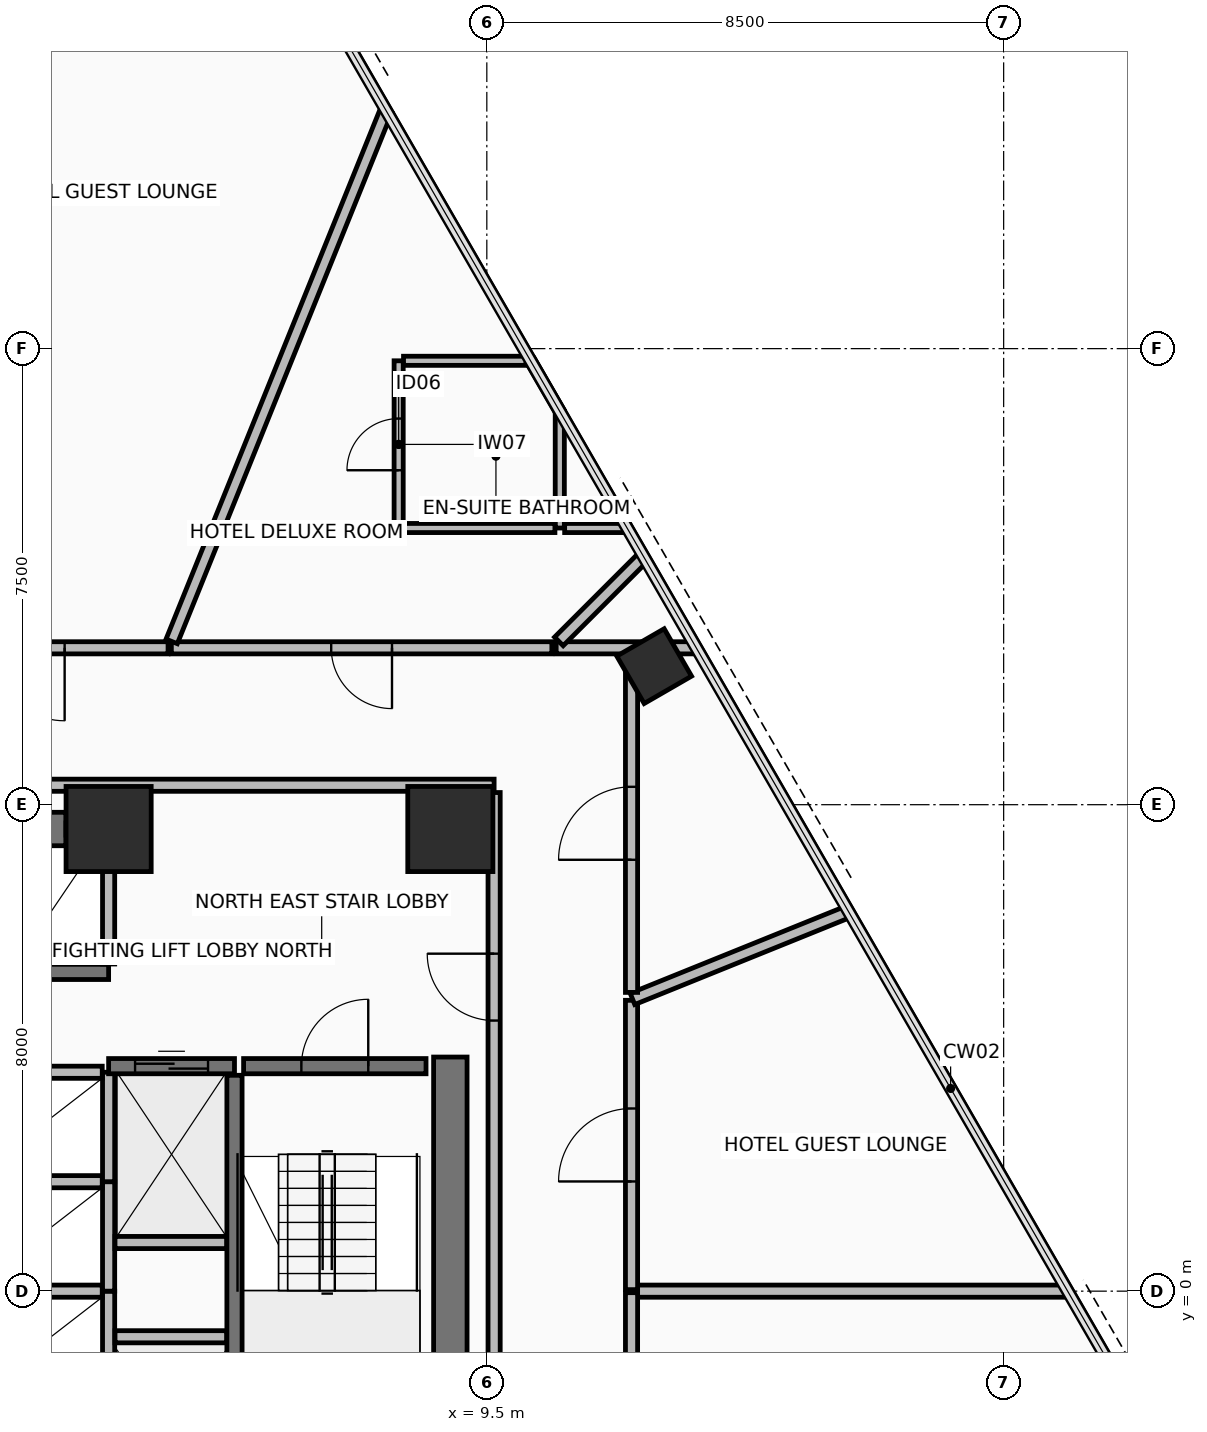
"""IFC4 building model, lengths in metres.
Left out: names, types, materials, properties, quantities, classifications, styles, units other than length and angle.
Written with IfcOpenShell. Run it as: python <this file> out.ifc"""

import sys

from ifc_helpers import new_model, si_unit, direction, frame, frame_2d, origin, origin_2d, place, context, subcontext, project, spatial, rectangle, hollow_rectangle, extrude, element, fill, save


model = new_model("IFC4")
c1 = context("Model", 3, precision=1e-05, world=origin(), true_north=direction((0.0, 1.0)))
c2 = subcontext(c1, "Body", "Model", "MODEL_VIEW")
j1 = project(units=[si_unit("LENGTHUNIT", "METRE"), si_unit("PLANEANGLEUNIT", "RADIAN")], contexts=[c1])
p1 = place(None, origin())
s1 = spatial("IfcSite", under=j1, at=p1, CompositionType="ELEMENT")
p2 = place(p1, origin())
s2 = spatial("IfcBuilding", under=s1, at=p2, CompositionType="ELEMENT")
p3 = place(p2, frame((0.0, 0.0, 42.05)))
s3 = spatial("IfcBuildingStorey", under=s2, at=p3, CompositionType="ELEMENT", Elevation=42.05)
for number, where, z_axis, x_axis in (
    (1, (8.9, 7.6, 0.0), (0.0, 0.0, 1.0), (1.0, 0.0, 0.0)),
    (2, (3.28, 7.6, 0.0), (0.0, 0.0, 1.0), (1.0, 0.0, 0.0)),
):
    element("IfcColumn", number, at=place(p3, frame(where, z_axis=z_axis, x_axis=x_axis)), inside=s3, PredefinedType="COLUMN", context=c2, shape_type="SweptSolid", body=[
        extrude(rectangle(XDim=1.4, YDim=1.4, at=origin_2d()), origin(), (0.0, 0.0, 1.0), 3.4),
    ])
p4 = place(p3, frame((12.252, 10.279, 0.0), z_axis=(0.0, 0.0, 1.0), x_axis=(-0.500001511499, 0.866024531118, 0.0)))
e3 = element("IfcColumn", 3, at=p4, inside=s3, PredefinedType="COLUMN", context=c2, shape_type="SweptSolid", body=[
    extrude(hollow_rectangle(XDim=0.9, YDim=0.9, WallThickness=0.05, at=origin_2d()), origin(), (0.0, 0.0, 1.0), 3.4),
])
p5 = place(p3, frame((3.8, 26.418, 0.0), z_axis=(0.0, 0.0, 1.0), x_axis=(-0.500005158081, -0.866022425744, 0.0)))
e4 = element("IfcWall", 4, at=p5, inside=s3, PredefinedType="STANDARD", context=c2, shape_type="SweptSolid", body=[
    extrude(rectangle(XDim=7.6, YDim=0.3, at=frame_2d((3.8, 0.0))), origin(), (0.0, 0.0, 1.0), 2.42),
])
p6 = place(p5, frame((3.25, 0.0, 0.0)))
e5 = element("IfcOpeningElement", 5, at=p6, cuts=e4, PredefinedType="OPENING", context=c2, shape_type="SweptSolid", body=[
    extrude(rectangle(XDim=1.1, YDim=2.2, at=frame_2d((0.55, 1.1))), frame((0.0, 0.16, 0.0), z_axis=(0.0, -1.0, 0.0), x_axis=(1.0, 0.0, 0.0)), (0.0, 0.0, 1.0), 0.32),
])
p7 = place(p3, frame((-2.8, 7.6, 0.0), z_axis=(0.0, 0.0, 1.0), x_axis=(1.0, 0.0, 0.0)))
e6 = element("IfcWall", 6, at=p7, inside=s3, PredefinedType="SHEAR", context=c2, shape_type="SweptSolid", body=[
    extrude(rectangle(XDim=5.38, YDim=0.55, at=frame_2d((2.69, 0.0))), origin(), (0.0, 0.0, 1.0), 3.225),
])
p8 = place(p3, frame((8.9, -6.85, 0.0), z_axis=(0.0, 0.0, 1.0), x_axis=(0.0, 1.0, 0.0)))
e7 = element("IfcWall", 7, at=p8, inside=s3, PredefinedType="SHEAR", context=c2, shape_type="SweptSolid", body=[
    extrude(rectangle(XDim=10.7, YDim=0.55, at=frame_2d((5.35, 0.0))), origin(), (0.0, 0.0, 1.0), 3.225),
])
p9 = place(p3, frame((9.62, 8.32, 0.0), z_axis=(0.0, 0.0, 1.0), x_axis=(-1.0, 0.0, 0.0)))
e8 = element("IfcWall", 8, at=p9, inside=s3, PredefinedType="PARTITIONING", context=c2, shape_type="SweptSolid", body=[
    extrude(rectangle(XDim=19.24, YDim=0.2, at=frame_2d((9.62, 0.0))), origin(), (0.0, 0.0, 1.0), 2.57),
])
p10 = place(p9, frame((15.745, 0.0, 0.0)))
e9 = element("IfcOpeningElement", 9, at=p10, cuts=e8, PredefinedType="OPENING", context=c2, shape_type="SweptSolid", body=[
    extrude(rectangle(XDim=0.9, YDim=2.1, at=frame_2d((0.45, 1.05))), frame((0.0, 0.11, 0.0), z_axis=(0.0, -1.0, 0.0), x_axis=(1.0, 0.0, 0.0)), (0.0, 0.0, 1.0), 0.22),
])
p11 = place(p9, frame((13.795, 0.0, 0.0)))
e10 = element("IfcOpeningElement", 10, at=p11, cuts=e8, PredefinedType="OPENING", context=c2, shape_type="SweptSolid", body=[
    extrude(rectangle(XDim=0.9, YDim=2.1, at=frame_2d((0.45, 1.05))), frame((0.0, 0.11, 0.0), z_axis=(0.0, -1.0, 0.0), x_axis=(1.0, 0.0, 0.0)), (0.0, 0.0, 1.0), 0.22),
])
p12 = place(p3, frame((9.62, -8.2, 0.0), z_axis=(0.0, 0.0, 1.0), x_axis=(0.0, 1.0, 0.0)))
e11 = element("IfcWall", 11, at=p12, inside=s3, PredefinedType="PARTITIONING", context=c2, shape_type="SweptSolid", body=[
    extrude(rectangle(XDim=16.4, YDim=0.2, at=frame_2d((8.2, 0.0))), origin(), (0.0, 0.0, 1.0), 2.62),
])
p13 = place(p12, frame((12.65, 0.0, 0.0)))
e12 = element("IfcOpeningElement", 12, at=p13, cuts=e11, PredefinedType="OPENING", context=c2, shape_type="SweptSolid", body=[
    extrude(rectangle(XDim=1.1, YDim=2.15, at=frame_2d((0.55, 1.075))), frame((0.0, 0.11, 0.0), z_axis=(0.0, -1.0, 0.0), x_axis=(1.0, 0.0, 0.0)), (0.0, 0.0, 1.0), 0.22),
])
p14 = place(p3, frame((5.35, -3.75, 0.0), z_axis=(0.0, 0.0, 1.0), x_axis=(0.0, 1.0, 0.0)))
e13 = element("IfcWall", 13, at=p14, inside=s3, PredefinedType="SHEAR", context=c2, shape_type="SweptSolid", body=[
    extrude(rectangle(XDim=7.3, YDim=0.25, at=frame_2d((3.65, 0.0))), origin(), (0.0, 0.0, 1.0), 3.225),
])
p15 = place(p3, frame((5.5, 3.7, 0.0), z_axis=(0.0, 0.0, 1.0), x_axis=(1.0, 0.0, 0.0)))
e14 = element("IfcWall", 14, at=p15, inside=s3, PredefinedType="SHEAR", context=c2, shape_type="SweptSolid", body=[
    extrude(rectangle(XDim=3.0, YDim=0.25, at=frame_2d((1.5, 0.0))), origin(), (0.0, 0.0, 1.0), 3.225),
])
p16 = place(p15, frame((0.95, 0.0, 0.0)))
e15 = element("IfcOpeningElement", 15, at=p16, cuts=e14, PredefinedType="OPENING", context=c2, shape_type="SweptSolid", body=[
    extrude(rectangle(XDim=1.1, YDim=2.15, at=frame_2d((0.55, 1.075))), frame((0.0, 0.135, 0.0), z_axis=(0.0, -1.0, 0.0), x_axis=(1.0, 0.0, 0.0)), (0.0, 0.0, 1.0), 0.27),
])
p17 = place(p3, frame((1.637, 5.25, 0.0), z_axis=(0.0, 0.0, 1.0), x_axis=(1.0, 0.0, 0.0)))
e16 = element("IfcWall", 16, at=p17, inside=s3, PredefinedType="SHEAR", context=c2, shape_type="SweptSolid", body=[
    extrude(rectangle(XDim=1.643, YDim=0.25, at=frame_2d((0.821, 0.0))), origin(), (0.0, 0.0, 1.0), 3.225),
])
p18 = place(p3, frame((2.58, 7.6, 0.0), z_axis=(0.0, 0.0, 1.0), x_axis=(1.0, 0.0, 0.0)))
e17 = element("IfcWall", 17, at=p18, inside=s3, PredefinedType="PARTITIONING", context=c2, shape_type="SweptSolid", body=[
    extrude(rectangle(XDim=0.7, YDim=0.2, at=frame_2d((0.35, 0.0))), origin(), (0.0, 0.0, 1.0), 2.42),
])
p19 = place(p3, frame((3.28, 5.38, 0.0), z_axis=(0.0, 0.0, 1.0), x_axis=(0.0, 1.0, 0.0)))
e18 = element("IfcWall", 18, at=p19, inside=s3, PredefinedType="PARTITIONING", context=c2, shape_type="SweptSolid", body=[
    extrude(rectangle(XDim=2.115, YDim=0.2, at=frame_2d((1.058, 0.0))), origin(), (0.0, 0.0, 1.0), 2.42),
])
p20 = place(p3, frame((3.28, -1.8, 0.0), z_axis=(0.0, 0.0, 1.0), x_axis=(0.0, 1.0, 0.0)))
e19 = element("IfcWall", 19, at=p20, inside=s3, PredefinedType="PARTITIONING", context=c2, shape_type="SweptSolid", body=[
    extrude(rectangle(XDim=1.8, YDim=0.2, at=frame_2d((0.9, 0.0))), origin(), (0.0, 0.0, 1.0), 3.225),
])
p21 = place(p3, frame((1.13, 0.0, 0.0), z_axis=(0.0, 0.0, 1.0), x_axis=(1.0, 0.0, 0.0)))
e20 = element("IfcWall", 20, at=p21, inside=s3, PredefinedType="PARTITIONING", context=c2, shape_type="SweptSolid", body=[
    extrude(rectangle(XDim=2.045, YDim=0.2, at=frame_2d((1.022, 0.0))), origin(), (0.0, 0.0, 1.0), 3.225),
])
p22 = place(p3, frame((3.28, 0.0, 0.0), z_axis=(0.0, 0.0, 1.0), x_axis=(0.0, 1.0, 0.0)))
e21 = element("IfcWall", 21, at=p22, inside=s3, PredefinedType="PARTITIONING", context=c2, shape_type="SweptSolid", body=[
    extrude(rectangle(XDim=1.8, YDim=0.2, at=frame_2d((0.9, 0.0))), origin(), (0.0, 0.0, 1.0), 3.225),
])
p23 = place(p3, frame((1.13, 1.8, 0.0), z_axis=(0.0, 0.0, 1.0), x_axis=(1.0, 0.0, 0.0)))
e22 = element("IfcWall", 22, at=p23, inside=s3, PredefinedType="PARTITIONING", context=c2, shape_type="SweptSolid", body=[
    extrude(rectangle(XDim=2.045, YDim=0.2, at=frame_2d((1.022, 0.0))), origin(), (0.0, 0.0, 1.0), 3.225),
])
p24 = place(p3, frame((3.28, 1.8, 0.0), z_axis=(0.0, 0.0, 1.0), x_axis=(0.0, 1.0, 0.0)))
e23 = element("IfcWall", 23, at=p24, inside=s3, PredefinedType="PARTITIONING", context=c2, shape_type="SweptSolid", body=[
    extrude(rectangle(XDim=1.8, YDim=0.2, at=frame_2d((0.9, 0.0))), origin(), (0.0, 0.0, 1.0), 3.225),
])
p25 = place(p3, frame((1.13, 3.6, 0.0), z_axis=(0.0, 0.0, 1.0), x_axis=(1.0, 0.0, 0.0)))
e24 = element("IfcWall", 24, at=p25, inside=s3, PredefinedType="PARTITIONING", context=c2, shape_type="SweptSolid", body=[
    extrude(rectangle(XDim=2.045, YDim=0.2, at=frame_2d((1.022, 0.0))), origin(), (0.0, 0.0, 1.0), 2.42),
])
p26 = place(p3, frame((3.28, 3.7, 0.0), z_axis=(0.0, 0.0, 1.0), x_axis=(1.0, 0.0, 0.0)))
e25 = element("IfcWall", 25, at=p26, inside=s3, PredefinedType="SHEAR", context=c2, shape_type="SweptSolid", body=[
    extrude(rectangle(XDim=2.07, YDim=0.25, at=frame_2d((1.035, 0.0))), origin(), (0.0, 0.0, 1.0), 3.225),
])
p27 = place(p26, frame((0.435, 0.0, 0.0)))
e26 = element("IfcOpeningElement", 26, at=p27, cuts=e25, PredefinedType="OPENING", context=c2, shape_type="SweptSolid", body=[
    extrude(rectangle(XDim=1.2, YDim=2.2, at=frame_2d((0.6, 1.1))), frame((0.0, 0.135, 0.0), z_axis=(0.0, -1.0, 0.0), x_axis=(1.0, 0.0, 0.0)), (0.0, 0.0, 1.0), 0.27),
])
for number, where, z_axis, x_axis in (
    (27, (3.385, 0.8, 0.0), (0.0, 0.0, 1.0), (1.0, 0.0, 0.0)),
    (28, (3.385, -0.75, 0.0), (0.0, 0.0, 1.0), (1.0, 0.0, 0.0)),
):
    element("IfcWall", number, at=place(p3, frame(where, z_axis=z_axis, x_axis=x_axis)), inside=s3, PredefinedType="PARTITIONING", context=c2, shape_type="SweptSolid", body=[
        extrude(rectangle(XDim=1.835, YDim=0.2, at=frame_2d((0.917, 0.0))), origin(), (0.0, 0.0, 1.0), 3.225),
    ])
p28 = place(p3, frame((8.05, 12.55, 0.0), z_axis=(0.0, 0.0, 1.0), x_axis=(0.0, 1.0, 0.0)))
e29 = element("IfcWall", 29, at=p28, inside=s3, PredefinedType="PARTITIONING", context=c2, shape_type="SweptSolid", body=[
    extrude(rectangle(XDim=2.75, YDim=0.15, at=frame_2d((1.375, 0.0))), origin(), (0.0, 0.0, 1.0), 2.82),
])
p29 = place(p28, frame((0.95, 0.0, 0.0)))
e30 = element("IfcOpeningElement", 30, at=p29, cuts=e29, PredefinedType="OPENING", context=c2, shape_type="SweptSolid", body=[
    extrude(rectangle(XDim=0.85, YDim=2.1, at=frame_2d((0.425, 1.05))), frame((0.0, 0.085, 0.0), z_axis=(0.0, -1.0, 0.0), x_axis=(1.0, 0.0, 0.0)), (0.0, 0.0, 1.0), 0.17),
])
p30 = place(p3, frame((8.13, 15.3, 0.0), z_axis=(0.0, 0.0, 1.0), x_axis=(1.0, 0.0, 0.0)))
e31 = element("IfcWall", 31, at=p30, inside=s3, PredefinedType="PARTITIONING", context=c2, shape_type="SweptSolid", body=[
    extrude(rectangle(XDim=2.089, YDim=0.15, at=frame_2d((1.044, 0.0))), origin(), (0.0, 0.0, 1.0), 2.42),
])
p31 = place(p3, frame((10.219, 15.3, 0.0), z_axis=(0.0, 0.0, 1.0), x_axis=(0.500015396624, -0.866016514357, 0.0)))
e32 = element("IfcWall", 32, at=p31, inside=s3, PredefinedType="PARTITIONING", context=c2, shape_type="SweptSolid", body=[
    extrude(rectangle(XDim=0.962, YDim=0.15, at=frame_2d((0.481, 0.0))), origin(), (0.0, 0.0, 1.0), 3.225),
])
p32 = place(p3, frame((10.7, 14.467, 0.0), z_axis=(0.0, 0.0, 1.0), x_axis=(0.0, -1.0, 0.0)))
e33 = element("IfcWall", 33, at=p32, inside=s3, PredefinedType="PARTITIONING", context=c2, shape_type="SweptSolid", body=[
    extrude(rectangle(XDim=1.917, YDim=0.15, at=frame_2d((0.958, 0.0))), origin(), (0.0, 0.0, 1.0), 2.42),
])
p33 = place(p3, frame((11.807, 12.55, 0.0), z_axis=(0.0, 0.0, 1.0), x_axis=(-1.0, 0.0, 0.0)))
e34 = element("IfcWall", 34, at=p33, inside=s3, PredefinedType="PARTITIONING", context=c2, shape_type="SweptSolid", body=[
    extrude(rectangle(XDim=1.027, YDim=0.15, at=frame_2d((0.513, 0.0))), origin(), (0.0, 0.0, 1.0), 2.42),
])
p34 = place(p3, frame((10.62, 12.55, 0.0), z_axis=(0.0, 0.0, 1.0), x_axis=(-1.0, 0.0, 0.0)))
e35 = element("IfcWall", 35, at=p34, inside=s3, PredefinedType="PARTITIONING", context=c2, shape_type="SweptSolid", body=[
    extrude(rectangle(XDim=2.49, YDim=0.15, at=frame_2d((1.245, 0.0))), origin(), (0.0, 0.0, 1.0), 2.82),
])
p35 = place(p3, frame((19.052, 0.0, 0.0), z_axis=(0.0, 0.0, 1.0), x_axis=(-1.0, 0.0, 0.0)))
e36 = element("IfcWall", 36, at=p35, inside=s3, PredefinedType="PARTITIONING", context=c2, shape_type="SweptSolid", body=[
    extrude(rectangle(XDim=7.147, YDim=0.2, at=frame_2d((3.574, 0.0))), origin(), (0.0, 0.0, 1.0), 2.42),
])
p36 = place(p3, frame((11.88, 0.025, 0.0), z_axis=(0.0, 0.0, 1.0), x_axis=(0.0, 1.0, 0.0)))
e37 = element("IfcWall", 37, at=p36, inside=s3, PredefinedType="PARTITIONING", context=c2, shape_type="SweptSolid", body=[
    extrude(rectangle(XDim=4.758, YDim=0.2, at=frame_2d((2.379, 0.0))), origin(), (0.0, 0.0, 1.0), 2.82),
])
p37 = place(p36, frame((1.779, 0.0, 0.0)))
e38 = element("IfcOpeningElement", 38, at=p37, cuts=e37, PredefinedType="OPENING", context=c2, shape_type="SweptSolid", body=[
    extrude(rectangle(XDim=1.2, YDim=2.15, at=frame_2d((0.6, 1.075))), frame((0.0, 0.11, 0.0), z_axis=(0.0, -1.0, 0.0), x_axis=(1.0, 0.0, 0.0)), (0.0, 0.0, 1.0), 0.22),
])
p38 = place(p3, frame((11.896, 4.806, 0.0), z_axis=(0.0, 0.0, 1.0), x_axis=(0.927185357501, 0.374602873501, 0.0)))
e39 = element("IfcWall", 39, at=p38, inside=s3, PredefinedType="PARTITIONING", context=c2, shape_type="SweptSolid", body=[
    extrude(rectangle(XDim=3.811, YDim=0.2, at=frame_2d((1.905, 0.0))), origin(), (0.0, 0.0, 1.0), 2.42),
])
p39 = place(p3, frame((12.944, 10.58, 0.0), z_axis=(0.0, 0.0, 1.0), x_axis=(-1.0, 0.0, 0.0)))
e40 = element("IfcWall", 40, at=p39, inside=s3, PredefinedType="PARTITIONING", context=c2, shape_type="SweptSolid", body=[
    extrude(rectangle(XDim=2.304, YDim=0.2, at=frame_2d((1.152, 0.0))), origin(), (0.0, 0.0, 1.0), 2.42),
])
p40 = place(p3, frame((10.685, 10.685, 0.0), z_axis=(0.0, 0.0, 1.0), x_axis=(0.707106781187, 0.707106781187, 0.0)))
e41 = element("IfcWall", 41, at=p40, inside=s3, PredefinedType="PARTITIONING", context=c2, shape_type="SweptSolid", body=[
    extrude(rectangle(XDim=1.971, YDim=0.2, at=frame_2d((0.986, 0.0))), origin(), (0.0, 0.0, 1.0), 2.42),
])
p41 = place(p3, frame((11.88, 4.913, 0.0), z_axis=(0.0, 0.0, 1.0), x_axis=(0.0, 1.0, 0.0)))
e42 = element("IfcWall", 42, at=p41, inside=s3, PredefinedType="PARTITIONING", context=c2, shape_type="SweptSolid", body=[
    extrude(rectangle(XDim=5.562, YDim=0.2, at=frame_2d((2.781, 0.0))), origin(), (0.0, 0.0, 1.0), 2.42),
])
p42 = place(p41, frame((2.181, 0.0, 0.0)))
e43 = element("IfcOpeningElement", 43, at=p42, cuts=e42, PredefinedType="OPENING", context=c2, shape_type="SweptSolid", body=[
    extrude(rectangle(XDim=1.2, YDim=2.15, at=frame_2d((0.6, 1.075))), frame((0.0, 0.11, 0.0), z_axis=(0.0, -1.0, 0.0), x_axis=(1.0, 0.0, 0.0)), (0.0, 0.0, 1.0), 0.22),
])
p43 = place(p3, frame((10.57, 10.58, 0.0), z_axis=(0.0, 0.0, 1.0), x_axis=(-1.0, 0.0, 0.0)))
e44 = element("IfcWall", 44, at=p43, inside=s3, PredefinedType="PARTITIONING", context=c2, shape_type="SweptSolid", body=[
    extrude(rectangle(XDim=6.258, YDim=0.2, at=frame_2d((3.129, 0.0))), origin(), (0.0, 0.0, 1.0), 2.82),
])
p44 = place(p43, frame((2.629, 0.0, 0.0)))
e45 = element("IfcOpeningElement", 45, at=p44, cuts=e44, PredefinedType="OPENING", context=c2, shape_type="SweptSolid", body=[
    extrude(rectangle(XDim=1.0, YDim=2.15, at=frame_2d((0.5, 1.075))), frame((0.0, 0.11, 0.0), z_axis=(0.0, -1.0, 0.0), x_axis=(1.0, 0.0, 0.0)), (0.0, 0.0, 1.0), 0.22),
])
p45 = place(p3, frame((4.317, 10.685, 0.0), z_axis=(0.0, 0.0, 1.0), x_axis=(0.374616543298, 0.927179834492, 0.0)))
e46 = element("IfcWall", 46, at=p45, inside=s3, PredefinedType="PARTITIONING", context=c2, shape_type="SweptSolid", body=[
    extrude(rectangle(XDim=9.415, YDim=0.2, at=frame_2d((4.707, 0.0))), origin(), (0.0, 0.0, 1.0), 2.42),
])
p46 = place(p3, frame((4.258, 10.58, 0.0), z_axis=(0.0, 0.0, 1.0), x_axis=(-1.0, 0.0, 0.0)))
e47 = element("IfcWall", 47, at=p46, inside=s3, PredefinedType="PARTITIONING", context=c2, shape_type="SweptSolid", body=[
    extrude(rectangle(XDim=4.603, YDim=0.2, at=frame_2d((2.302, 0.0))), origin(), (0.0, 0.0, 1.0), 2.57),
])
p47 = place(p46, frame((1.701, 0.0, 0.0)))
e48 = element("IfcOpeningElement", 48, at=p47, cuts=e47, PredefinedType="OPENING", context=c2, shape_type="SweptSolid", body=[
    extrude(rectangle(XDim=1.2, YDim=2.15, at=frame_2d((0.6, 1.075))), frame((0.0, 0.11, 0.0), z_axis=(0.0, -1.0, 0.0), x_axis=(1.0, 0.0, 0.0)), (0.0, 0.0, 1.0), 0.22),
])
p48 = place(p3, frame((11.88, -5.524, 0.0), z_axis=(0.0, 0.0, 1.0), x_axis=(0.0, 1.0, 0.0)))
e49 = element("IfcWall", 49, at=p48, inside=s3, PredefinedType="PARTITIONING", context=c2, shape_type="SweptSolid", body=[
    extrude(rectangle(XDim=5.499, YDim=0.2, at=frame_2d((2.75, 0.0))), origin(), (0.0, 0.0, 1.0), 3.225),
])
p49 = place(p48, frame((2.249, 0.0, 0.0)))
e50 = element("IfcOpeningElement", 50, at=p49, cuts=e49, PredefinedType="OPENING", context=c2, shape_type="SweptSolid", body=[
    extrude(rectangle(XDim=1.0, YDim=2.15, at=frame_2d((0.5, 1.075))), frame((0.0, 0.11, 0.0), z_axis=(0.0, -1.0, 0.0), x_axis=(1.0, 0.0, 0.0)), (0.0, 0.0, 1.0), 0.22),
])
p50 = place(p13, frame((1.1, 0.0, 0.0), z_axis=(0.0, 0.0, 1.0), x_axis=(-1.0, 0.0, 0.0)))
e51 = element("IfcDoor", 51, at=p50, inside=s3, OperationType="SINGLE_SWING_LEFT", PredefinedType="DOOR", context=c2, shape_type="SweptSolid", body=[
    extrude(rectangle(XDim=1.1, YDim=2.15, at=frame_2d((0.55, 1.075))), frame((0.0, 0.025, 0.0), z_axis=(0.0, -1.0, 0.0), x_axis=(1.0, 0.0, 0.0)), (0.0, 0.0, 1.0), 0.05),
])
fill(e12, e51)
p51 = place(p16, frame((1.1, 0.0, 0.0), z_axis=(0.0, 0.0, 1.0), x_axis=(-1.0, 0.0, 0.0)))
e52 = element("IfcDoor", 52, at=p51, inside=s3, OperationType="SINGLE_SWING_LEFT", PredefinedType="DOOR", context=c2, shape_type="SweptSolid", body=[
    extrude(rectangle(XDim=1.1, YDim=2.15, at=frame_2d((0.55, 1.075))), frame((0.0, 0.025, 0.0), z_axis=(0.0, -1.0, 0.0), x_axis=(1.0, 0.0, 0.0)), (0.0, 0.0, 1.0), 0.05),
])
fill(e15, e52)
p52 = place(p27, origin())
e53 = element("IfcDoor", 53, at=p52, inside=s3, OperationType="SLIDING_TO_RIGHT", PredefinedType="DOOR", context=c2, shape_type="SweptSolid", body=[
    extrude(rectangle(XDim=1.2, YDim=2.2, at=frame_2d((0.6, 1.1))), frame((0.0, 0.025, 0.0), z_axis=(0.0, -1.0, 0.0), x_axis=(1.0, 0.0, 0.0)), (0.0, 0.0, 1.0), 0.05),
])
fill(e26, e53)
p53 = place(p29, origin())
e54 = element("IfcDoor", 54, at=p53, inside=s3, OperationType="SINGLE_SWING_RIGHT", PredefinedType="DOOR", context=c2, shape_type="SweptSolid", body=[
    extrude(rectangle(XDim=0.85, YDim=2.1, at=frame_2d((0.425, 1.05))), frame((0.0, 0.025, 0.0), z_axis=(0.0, -1.0, 0.0), x_axis=(1.0, 0.0, 0.0)), (0.0, 0.0, 1.0), 0.05),
])
fill(e30, e54)
p54 = place(p37, origin())
e55 = element("IfcDoor", 55, at=p54, inside=s3, OperationType="SINGLE_SWING_LEFT", PredefinedType="DOOR", context=c2, shape_type="SweptSolid", body=[
    extrude(rectangle(XDim=1.2, YDim=2.15, at=frame_2d((0.6, 1.075))), frame((0.0, 0.025, 0.0), z_axis=(0.0, -1.0, 0.0), x_axis=(1.0, 0.0, 0.0)), (0.0, 0.0, 1.0), 0.05),
])
fill(e38, e55)
p55 = place(p42, origin())
e56 = element("IfcDoor", 56, at=p55, inside=s3, OperationType="SINGLE_SWING_LEFT", PredefinedType="DOOR", context=c2, shape_type="SweptSolid", body=[
    extrude(rectangle(XDim=1.2, YDim=2.15, at=frame_2d((0.6, 1.075))), frame((0.0, 0.025, 0.0), z_axis=(0.0, -1.0, 0.0), x_axis=(1.0, 0.0, 0.0)), (0.0, 0.0, 1.0), 0.05),
])
fill(e43, e56)
p56 = place(p44, origin())
e57 = element("IfcDoor", 57, at=p56, inside=s3, OperationType="SINGLE_SWING_LEFT", PredefinedType="DOOR", context=c2, shape_type="SweptSolid", body=[
    extrude(rectangle(XDim=1.0, YDim=2.15, at=frame_2d((0.5, 1.075))), frame((0.0, 0.025, 0.0), z_axis=(0.0, -1.0, 0.0), x_axis=(1.0, 0.0, 0.0)), (0.0, 0.0, 1.0), 0.05),
])
fill(e45, e57)
p57 = place(p47, origin())
e58 = element("IfcDoor", 58, at=p57, inside=s3, OperationType="SINGLE_SWING_LEFT", PredefinedType="DOOR", context=c2, shape_type="SweptSolid", body=[
    extrude(rectangle(XDim=1.2, YDim=2.15, at=frame_2d((0.6, 1.075))), frame((0.0, 0.025, 0.0), z_axis=(0.0, -1.0, 0.0), x_axis=(1.0, 0.0, 0.0)), (0.0, 0.0, 1.0), 0.05),
])
fill(e48, e58)
save(model, sys.argv[1])
